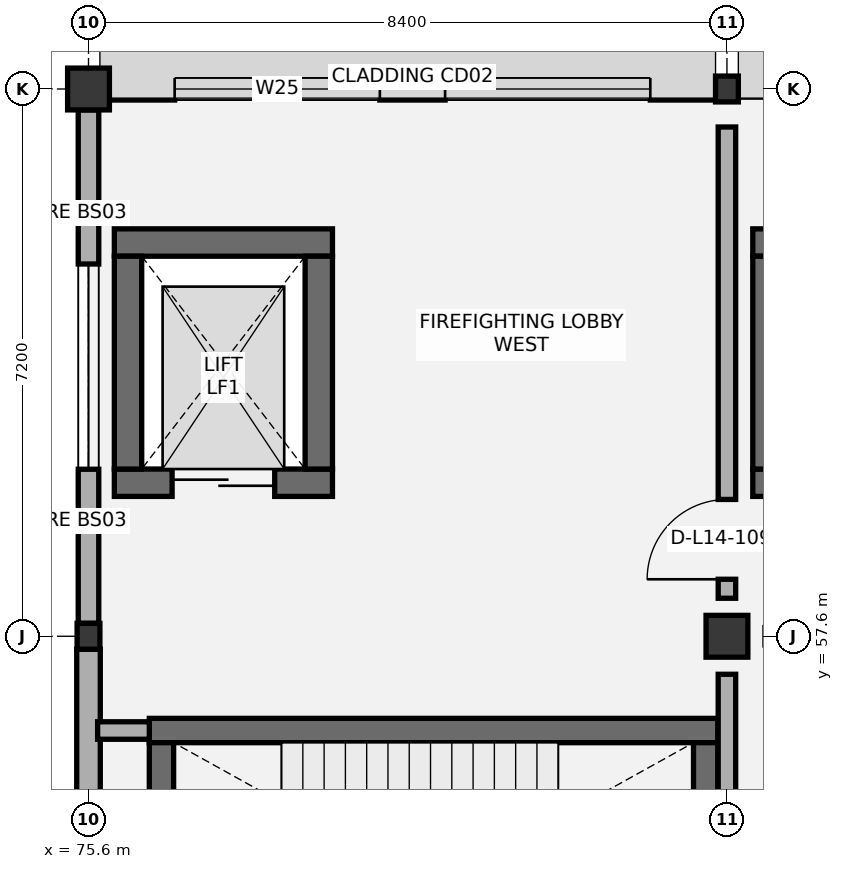
"""IFC4 building model, lengths in metres.
Left out: names, types, materials, properties, quantities, classifications, styles, units other than length and angle.
Written with IfcOpenShell. Run it as: python <this file> out.ifc"""

import sys

from ifc_helpers import new_model, si_unit, direction, frame, frame_2d, origin, origin_2d, place, context, subcontext, project, spatial, rectangle, i_section, extrude, element, fill, save


model = new_model("IFC4")
c1 = context("Model", 3, precision=1e-05, world=origin(), true_north=direction((0.0, 1.0)))
c2 = subcontext(c1, "Body", "Model", "MODEL_VIEW")
j1 = project(units=[si_unit("LENGTHUNIT", "METRE"), si_unit("PLANEANGLEUNIT", "RADIAN")], contexts=[c1])
p1 = place(None, origin())
s1 = spatial("IfcSite", under=j1, at=p1, CompositionType="ELEMENT")
p2 = place(p1, origin())
s2 = spatial("IfcBuilding", under=s1, at=p2, CompositionType="ELEMENT")
p3 = place(p2, frame((0.0, 0.0, 64.8)))
s3 = spatial("IfcBuildingStorey", under=s2, at=p3, CompositionType="ELEMENT", Elevation=64.8)
p4 = place(p3, frame((75.6, 57.6, 0.0), z_axis=(0.0, 0.0, 1.0), x_axis=(1.0, 0.0, 0.0)))
e1 = element("IfcColumn", 1, at=p4, inside=s3, PredefinedType="COLUMN", context=c2, shape_type="SweptSolid", body=[
    extrude(i_section(OverallWidth=0.3, OverallDepth=0.34, WebThickness=0.012, FlangeThickness=0.021, FilletRadius=0.027, at=origin_2d()), origin(), (0.0, 0.0, 1.0), 4.2),
])
for number, where, z_axis, x_axis in (
    (2, (75.6, 64.8, 0.0), (0.0, 0.0, 1.0), (1.0, 0.0, 0.0)),
    (3, (84.0, 57.6, 0.0), (0.0, 0.0, 1.0), (1.0, 0.0, 0.0)),
):
    element("IfcColumn", number, at=place(p3, frame(where, z_axis=z_axis, x_axis=x_axis)), inside=s3, PredefinedType="COLUMN", context=c2, shape_type="SweptSolid", body=[
        extrude(rectangle(XDim=0.55, YDim=0.55, at=origin_2d()), origin(), (0.0, 0.0, 1.0), 4.2),
    ])
p5 = place(p3, frame((84.0, 64.8, 0.0), z_axis=(0.0, 0.0, 1.0), x_axis=(1.0, 0.0, 0.0)))
e4 = element("IfcColumn", 4, at=p5, inside=s3, PredefinedType="COLUMN", context=c2, shape_type="SweptSolid", body=[
    extrude(i_section(OverallWidth=0.3, OverallDepth=0.34, WebThickness=0.012, FlangeThickness=0.021, FilletRadius=0.027, at=origin_2d()), origin(), (0.0, 0.0, 1.0), 4.2),
])
p6 = place(p3, frame((76.4, 56.36, 0.0), z_axis=(0.0, 0.0, 1.0), x_axis=(1.0, 0.0, 0.0)))
e5 = element("IfcWall", 5, at=p6, inside=s3, PredefinedType="SHEAR", context=c2, shape_type="SweptSolid", body=[
    extrude(rectangle(XDim=7.48, YDim=0.32, at=frame_2d((3.74, 0.0))), origin(), (0.0, 0.0, 1.0), 3.9),
])
for number, where, z_axis, x_axis in (
    (6, (76.56, 52.4, 0.0), (0.0, 0.0, 1.0), (0.0, 1.0, 0.0)),
    (7, (83.72, 52.4, 0.0), (0.0, 0.0, 1.0), (0.0, 1.0, 0.0)),
):
    element("IfcWall", number, at=place(p3, frame(where, z_axis=z_axis, x_axis=x_axis)), inside=s3, PredefinedType="SHEAR", context=c2, shape_type="SweptSolid", body=[
        extrude(rectangle(XDim=3.8, YDim=0.32, at=frame_2d((1.9, 0.0))), origin(), (0.0, 0.0, 1.0), 3.9),
    ])
p7 = place(p3, frame((75.94, 62.78, 0.0), z_axis=(0.0, 0.0, 1.0), x_axis=(1.0, 0.0, 0.0)))
e8 = element("IfcWall", 8, at=p7, inside=s3, PredefinedType="SHEAR", context=c2, shape_type="SweptSolid", body=[
    extrude(rectangle(XDim=2.87, YDim=0.36, at=frame_2d((1.435, 0.0))), origin(), (0.0, 0.0, 1.0), 3.9),
])
p8 = place(p3, frame((75.94, 59.62, 0.0), z_axis=(0.0, 0.0, 1.0), x_axis=(1.0, 0.0, 0.0)))
e9 = element("IfcWall", 9, at=p8, inside=s3, PredefinedType="SHEAR", context=c2, shape_type="SweptSolid", body=[
    extrude(rectangle(XDim=2.87, YDim=0.36, at=frame_2d((1.435, 0.0))), origin(), (0.0, 0.0, 1.0), 3.9),
])
p9 = place(p8, frame((0.76, 0.0, 0.0)))
e10 = element("IfcOpeningElement", 10, at=p9, cuts=e9, PredefinedType="OPENING", context=c2, shape_type="SweptSolid", body=[
    extrude(rectangle(XDim=1.35, YDim=2.2, at=frame_2d((0.675, 1.1))), frame((0.0, 0.19, 0.0), z_axis=(0.0, -1.0, 0.0), x_axis=(1.0, 0.0, 0.0)), (0.0, 0.0, 1.0), 0.38),
])
for number, where, z_axis, x_axis in (
    (11, (76.12, 59.8, 0.0), (0.0, 0.0, 1.0), (0.0, 1.0, 0.0)),
    (12, (78.63, 59.8, 0.0), (0.0, 0.0, 1.0), (0.0, 1.0, 0.0)),
):
    element("IfcWall", number, at=place(p3, frame(where, z_axis=z_axis, x_axis=x_axis)), inside=s3, PredefinedType="SHEAR", context=c2, shape_type="SweptSolid", body=[
        extrude(rectangle(XDim=2.8, YDim=0.36, at=frame_2d((1.4, 0.0))), origin(), (0.0, 0.0, 1.0), 3.9),
    ])
p10 = place(p3, frame((84.34, 62.78, 0.0), z_axis=(0.0, 0.0, 1.0), x_axis=(1.0, 0.0, 0.0)))
e13 = element("IfcWall", 13, at=p10, inside=s3, PredefinedType="SHEAR", context=c2, shape_type="SweptSolid", body=[
    extrude(rectangle(XDim=7.77, YDim=0.36, at=frame_2d((3.885, 0.0))), origin(), (0.0, 0.0, 1.0), 3.9),
])
p11 = place(p3, frame((84.34, 59.62, 0.0), z_axis=(0.0, 0.0, 1.0), x_axis=(1.0, 0.0, 0.0)))
e14 = element("IfcWall", 14, at=p11, inside=s3, PredefinedType="SHEAR", context=c2, shape_type="SweptSolid", body=[
    extrude(rectangle(XDim=2.66, YDim=0.36, at=frame_2d((1.33, 0.0))), origin(), (0.0, 0.0, 1.0), 3.9),
])
p12 = place(p11, frame((0.78, 0.0, 0.0)))
e15 = element("IfcOpeningElement", 15, at=p12, cuts=e14, PredefinedType="OPENING", context=c2, shape_type="SweptSolid", body=[
    extrude(rectangle(XDim=1.1, YDim=2.15, at=frame_2d((0.55, 1.075))), frame((0.0, 0.19, 0.0), z_axis=(0.0, -1.0, 0.0), x_axis=(1.0, 0.0, 0.0)), (0.0, 0.0, 1.0), 0.38),
])
p13 = place(p3, frame((84.52, 59.8, 0.0), z_axis=(0.0, 0.0, 1.0), x_axis=(0.0, 1.0, 0.0)))
e16 = element("IfcWall", 16, at=p13, inside=s3, PredefinedType="SHEAR", context=c2, shape_type="SweptSolid", body=[
    extrude(rectangle(XDim=2.8, YDim=0.36, at=frame_2d((1.4, 0.0))), origin(), (0.0, 0.0, 1.0), 3.9),
])
p14 = place(p3, frame((75.6, 50.675, 0.0), z_axis=(0.0, 0.0, 1.0), x_axis=(0.0, 1.0, 0.0)))
e17 = element("IfcWall", 17, at=p14, inside=s3, PredefinedType="SOLIDWALL", context=c2, shape_type="SweptSolid", body=[
    extrude(rectangle(XDim=6.755, YDim=0.31, at=frame_2d((3.377, 0.0))), origin(), (0.0, 0.0, 1.0), 3.345),
])
p15 = place(p3, frame((75.875, 64.8, 0.0), z_axis=(0.0, 0.0, 1.0), x_axis=(1.0, 0.0, 0.0)))
e18 = element("IfcWall", 18, at=p15, inside=s3, PredefinedType="SOLIDWALL", context=c2, shape_type="SweptSolid", body=[
    extrude(rectangle(XDim=7.975, YDim=0.29, at=frame_2d((3.988, 0.0))), origin(), (0.0, 0.0, 1.0), 3.345),
])
p16 = place(p15, frame((0.858, 0.0, 0.95)))
e19 = element("IfcOpeningElement", 19, at=p16, cuts=e18, PredefinedType="OPENING", context=c2, shape_type="SweptSolid", body=[
    extrude(rectangle(XDim=2.7, YDim=1.65, at=frame_2d((1.35, 0.825))), frame((0.0, 0.155, 0.0), z_axis=(0.0, -1.0, 0.0), x_axis=(1.0, 0.0, 0.0)), (0.0, 0.0, 1.0), 0.31),
])
p17 = place(p15, frame((4.417, 0.0, 0.95)))
e20 = element("IfcOpeningElement", 20, at=p17, cuts=e18, PredefinedType="OPENING", context=c2, shape_type="SweptSolid", body=[
    extrude(rectangle(XDim=2.7, YDim=1.65, at=frame_2d((1.35, 0.825))), frame((0.0, 0.155, 0.0), z_axis=(0.0, -1.0, 0.0), x_axis=(1.0, 0.0, 0.0)), (0.0, 0.0, 1.0), 0.31),
])
p18 = place(p3, frame((75.6, 57.77, 0.0), z_axis=(0.0, 0.0, 1.0), x_axis=(0.0, 1.0, 0.0)))
e21 = element("IfcWall", 21, at=p18, inside=s3, PredefinedType="SOLIDWALL", context=c2, shape_type="SweptSolid", body=[
    extrude(rectangle(XDim=6.755, YDim=0.27, at=frame_2d((3.377, 0.0))), origin(), (0.0, 0.0, 1.0), 3.345),
])
p19 = place(p18, frame((2.028, 0.0, 0.95)))
e22 = element("IfcOpeningElement", 22, at=p19, cuts=e21, PredefinedType="OPENING", context=c2, shape_type="SweptSolid", body=[
    extrude(rectangle(XDim=2.7, YDim=1.65, at=frame_2d((1.35, 0.825))), frame((0.0, 0.145, 0.0), z_axis=(0.0, -1.0, 0.0), x_axis=(1.0, 0.0, 0.0)), (0.0, 0.0, 1.0), 0.29),
])
p20 = place(p3, frame((84.15, 64.8, 0.0), z_axis=(0.0, 0.0, 1.0), x_axis=(1.0, 0.0, 0.0)))
e23 = element("IfcWall", 23, at=p20, inside=s3, PredefinedType="SOLIDWALL", context=c2, shape_type="SweptSolid", body=[
    extrude(rectangle(XDim=7.975, YDim=0.215, at=frame_2d((3.988, 0.0))), origin(), (0.0, 0.0, 1.0), 3.345),
])
p21 = place(p20, frame((1.658, 0.0, 0.95)))
e24 = element("IfcOpeningElement", 24, at=p21, cuts=e23, PredefinedType="OPENING", context=c2, shape_type="SweptSolid", body=[
    extrude(rectangle(XDim=1.5, YDim=1.5, at=frame_2d((0.75, 0.75))), frame((0.0, 0.117, 0.0), z_axis=(0.0, -1.0, 0.0), x_axis=(1.0, 0.0, 0.0)), (0.0, 0.0, 1.0), 0.235),
])
p22 = place(p20, frame((4.817, 0.0, 0.95)))
e25 = element("IfcOpeningElement", 25, at=p22, cuts=e23, PredefinedType="OPENING", context=c2, shape_type="SweptSolid", body=[
    extrude(rectangle(XDim=1.5, YDim=1.5, at=frame_2d((0.75, 0.75))), frame((0.0, 0.117, 0.0), z_axis=(0.0, -1.0, 0.0), x_axis=(1.0, 0.0, 0.0)), (0.0, 0.0, 1.0), 0.235),
])
p23 = place(p3, frame((75.6, 64.92, 0.0), z_axis=(0.0, 0.0, 1.0), x_axis=(0.0, 1.0, 0.0)))
e26 = element("IfcWall", 26, at=p23, inside=s3, PredefinedType="PARAPET", context=c2, shape_type="SweptSolid", body=[
    extrude(rectangle(XDim=6.96, YDim=0.185, at=frame_2d((3.48, 0.0))), origin(), (0.0, 0.0, 1.0), 1.15),
])
p24 = place(p3, frame((84.0, 50.9, 0.0), z_axis=(0.0, 0.0, 1.0), x_axis=(0.0, 1.0, 0.0)))
e27 = element("IfcWall", 27, at=p24, inside=s3, PredefinedType="PARTITIONING", context=c2, shape_type="SweptSolid", body=[
    extrude(rectangle(XDim=6.2, YDim=0.23, at=frame_2d((3.1, 0.0))), origin(), (0.0, 0.0, 1.0), 3.395),
])
p25 = place(p24, frame((0.05, 0.0, 0.0)))
e28 = element("IfcOpeningElement", 28, at=p25, cuts=e27, PredefinedType="OPENING", context=c2, shape_type="SweptSolid", body=[
    extrude(rectangle(XDim=1.05, YDim=2.15, at=frame_2d((0.525, 1.075))), frame((0.0, 0.125, 0.0), z_axis=(0.0, -1.0, 0.0), x_axis=(1.0, 0.0, 0.0)), (0.0, 0.0, 1.0), 0.25),
])
p26 = place(p3, frame((75.72, 56.36, 0.0), z_axis=(0.0, 0.0, 1.0), x_axis=(1.0, 0.0, 0.0)))
e29 = element("IfcWall", 29, at=p26, inside=s3, PredefinedType="PARTITIONING", context=c2, shape_type="SweptSolid", body=[
    extrude(rectangle(XDim=0.68, YDim=0.23, at=frame_2d((0.34, 0.0))), origin(), (0.0, 0.0, 1.0), 3.9),
])
p27 = place(p3, frame((84.0, 58.1, 0.0), z_axis=(0.0, 0.0, 1.0), x_axis=(0.0, 1.0, 0.0)))
e30 = element("IfcWall", 30, at=p27, inside=s3, PredefinedType="PARTITIONING", context=c2, shape_type="SweptSolid", body=[
    extrude(rectangle(XDim=6.2, YDim=0.23, at=frame_2d((3.1, 0.0))), origin(), (0.0, 0.0, 1.0), 3.605),
])
p28 = place(p27, frame((0.25, 0.0, 0.0)))
e31 = element("IfcOpeningElement", 31, at=p28, cuts=e30, PredefinedType="OPENING", context=c2, shape_type="SweptSolid", body=[
    extrude(rectangle(XDim=1.05, YDim=2.15, at=frame_2d((0.525, 1.075))), frame((0.0, 0.125, 0.0), z_axis=(0.0, -1.0, 0.0), x_axis=(1.0, 0.0, 0.0)), (0.0, 0.0, 1.0), 0.25),
])
p29 = place(p16, origin())
e32 = element("IfcWindow", 32, at=p29, inside=s3, PartitioningType="SINGLE_PANEL", PredefinedType="WINDOW", context=c2, shape_type="SweptSolid", body=[
    extrude(rectangle(XDim=2.7, YDim=1.65, at=frame_2d((1.35, 0.825))), frame((0.0, 0.03, 0.0), z_axis=(0.0, -1.0, 0.0), x_axis=(1.0, 0.0, 0.0)), (0.0, 0.0, 1.0), 0.06),
])
fill(e19, e32)
p30 = place(p17, origin())
e33 = element("IfcWindow", 33, at=p30, inside=s3, PartitioningType="SINGLE_PANEL", PredefinedType="WINDOW", context=c2, shape_type="SweptSolid", body=[
    extrude(rectangle(XDim=2.7, YDim=1.65, at=frame_2d((1.35, 0.825))), frame((0.0, 0.03, 0.0), z_axis=(0.0, -1.0, 0.0), x_axis=(1.0, 0.0, 0.0)), (0.0, 0.0, 1.0), 0.06),
])
fill(e20, e33)
p31 = place(p19, origin())
e34 = element("IfcWindow", 34, at=p31, inside=s3, PartitioningType="SINGLE_PANEL", PredefinedType="WINDOW", context=c2, shape_type="SweptSolid", body=[
    extrude(rectangle(XDim=2.7, YDim=1.65, at=frame_2d((1.35, 0.825))), frame((0.0, 0.03, 0.0), z_axis=(0.0, -1.0, 0.0), x_axis=(1.0, 0.0, 0.0)), (0.0, 0.0, 1.0), 0.06),
])
fill(e22, e34)
p32 = place(p9, origin())
e35 = element("IfcDoor", 35, at=p32, inside=s3, OperationType="DOUBLE_DOOR_SLIDING", PredefinedType="DOOR", context=c2, shape_type="SweptSolid", body=[
    extrude(rectangle(XDim=1.35, YDim=2.2, at=frame_2d((0.675, 1.1))), frame((0.0, 0.025, 0.0), z_axis=(0.0, -1.0, 0.0), x_axis=(1.0, 0.0, 0.0)), (0.0, 0.0, 1.0), 0.05),
])
fill(e10, e35)
p33 = place(p28, origin())
e36 = element("IfcDoor", 36, at=p33, inside=s3, OperationType="SINGLE_SWING_LEFT", PredefinedType="DOOR", context=c2, shape_type="SweptSolid", body=[
    extrude(rectangle(XDim=1.05, YDim=2.15, at=frame_2d((0.525, 1.075))), frame((0.0, 0.025, 0.0), z_axis=(0.0, -1.0, 0.0), x_axis=(1.0, 0.0, 0.0)), (0.0, 0.0, 1.0), 0.05),
])
fill(e31, e36)
save(model, sys.argv[1])
